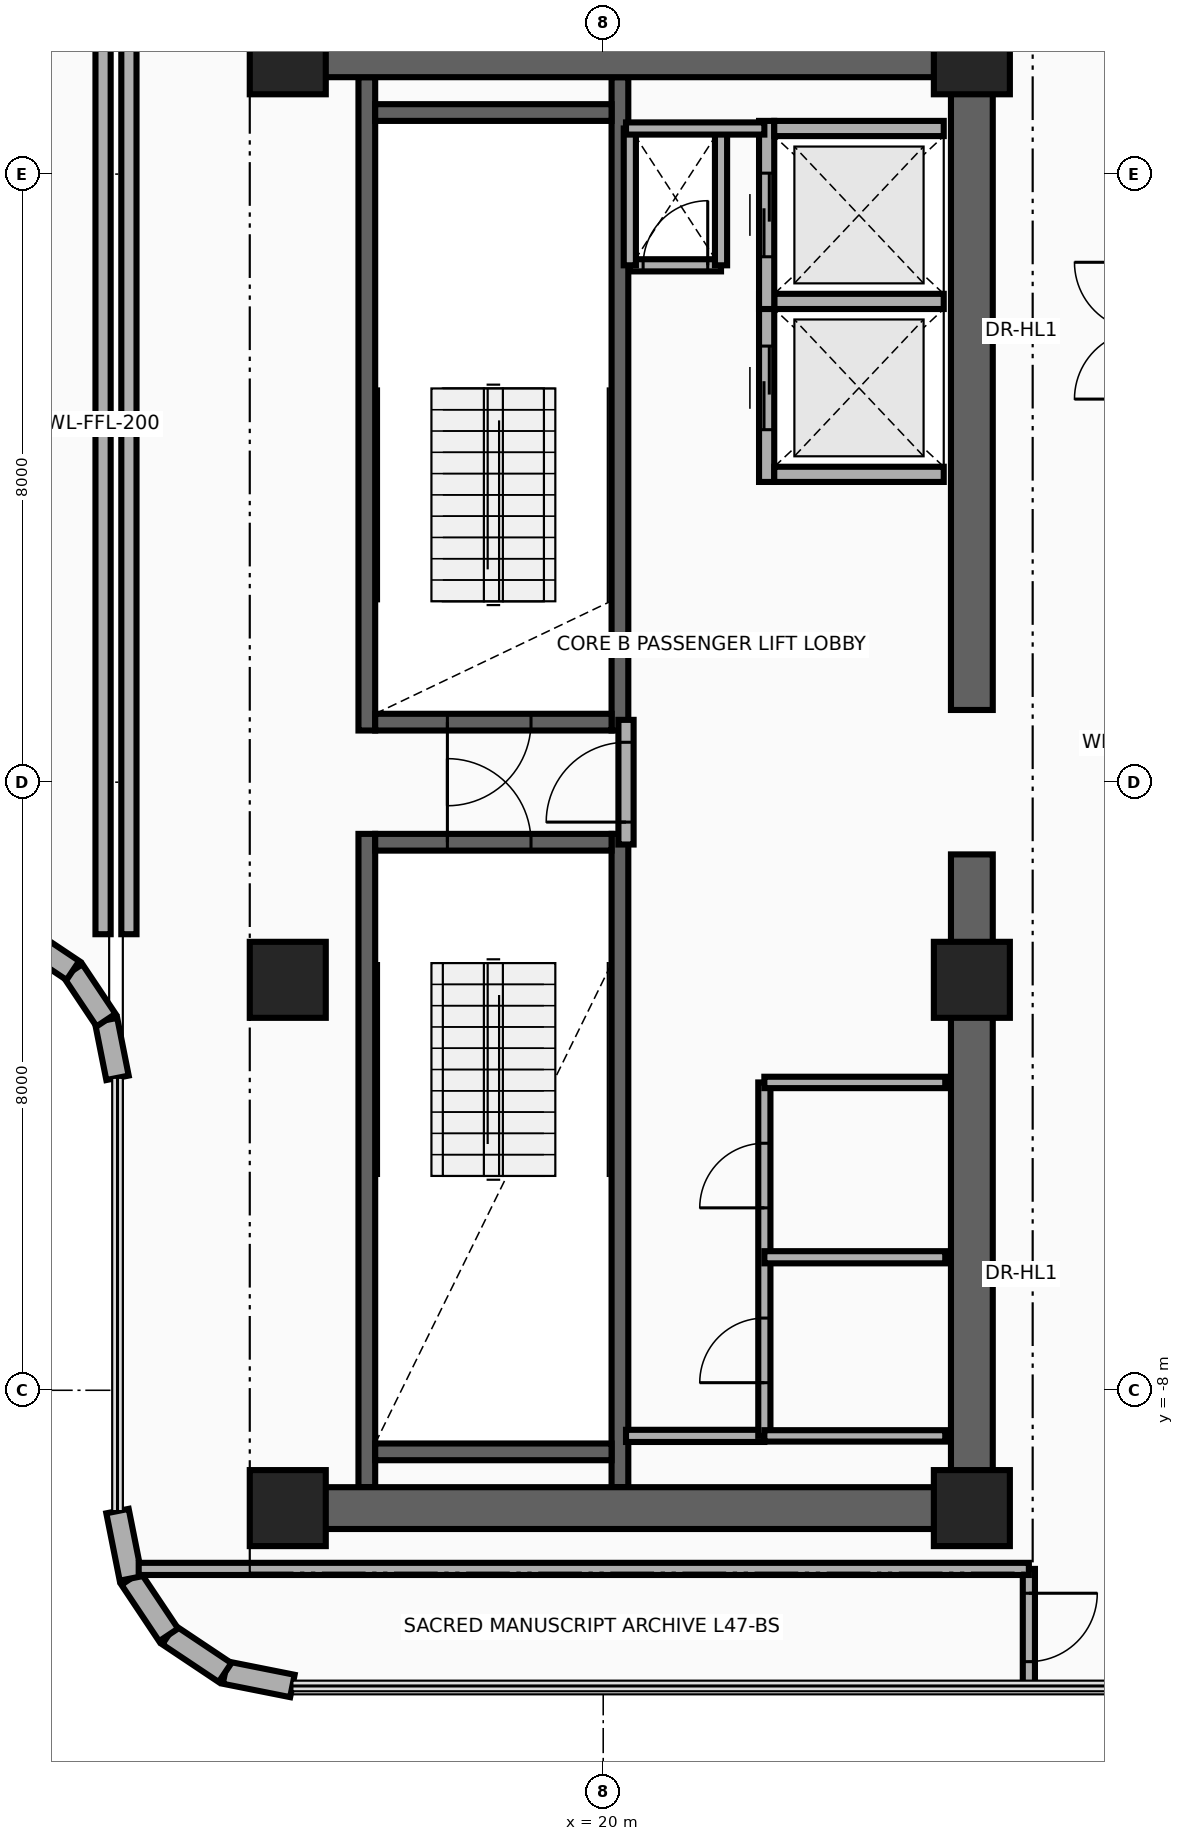
"""IFC4 building model, lengths in metres.
Left out: names, types, materials, properties, quantities, classifications, styles, units other than length and angle.
Written with IfcOpenShell. Run it as: python <this file> out.ifc"""

import sys

from ifc_helpers import new_model, si_unit, direction, frame, frame_2d, origin, origin_2d, place, context, subcontext, project, spatial, rectangle, extrude, source, transform, mapped, element, fill, save


model = new_model("IFC4")
c1 = context("Model", 3, precision=1e-05, world=origin(), true_north=direction((0.0, 1.0)))
c2 = subcontext(c1, "Body", "Model", "MODEL_VIEW")
j1 = project(units=[si_unit("LENGTHUNIT", "METRE"), si_unit("PLANEANGLEUNIT", "RADIAN")], contexts=[c1])
p1 = place(None, origin())
s1 = spatial("IfcSite", under=j1, at=p1, CompositionType="ELEMENT")
p2 = place(p1, origin())
s2 = spatial("IfcBuilding", under=s1, at=p2, CompositionType="ELEMENT")
p3 = place(p2, frame((0.0, 0.0, 184.45)))
s3 = spatial("IfcBuildingStorey", under=s2, at=p3, CompositionType="ELEMENT", Elevation=184.45)
for number, where, z_axis, x_axis in (
    (1, (16.89, 0.68, 0.0), (0.0, 0.0, 1.0), (0.0, 1.0, 0.0)),
    (2, (20.22, 0.68, 0.0), (0.0, 0.0, 1.0), (0.0, 1.0, 0.0)),
):
    element("IfcWall", number, at=place(p3, frame(where, z_axis=z_axis, x_axis=x_axis)), inside=s3, PredefinedType="SHEAR", context=c2, shape_type="SweptSolid", body=[
        extrude(rectangle(XDim=8.595, YDim=0.22, at=frame_2d((4.297, 0.0))), origin(), (0.0, 0.0, 1.0), 3.63),
    ])
p4 = place(p3, frame((17.0, 0.79, 0.0), z_axis=(0.0, 0.0, 1.0), x_axis=(1.0, 0.0, 0.0)))
e3 = element("IfcWall", 3, at=p4, inside=s3, PredefinedType="SHEAR", context=c2, shape_type="SweptSolid", body=[
    extrude(rectangle(XDim=3.11, YDim=0.22, at=frame_2d((1.555, 0.0))), origin(), (0.0, 0.0, 1.0), 3.63),
])
p5 = place(p4, frame((0.95, 0.0, 0.0)))
e4 = element("IfcOpeningElement", 4, at=p5, cuts=e3, PredefinedType="OPENING", context=c2, shape_type="SweptSolid", body=[
    extrude(rectangle(XDim=1.1, YDim=2.15, at=frame_2d((0.55, 1.075))), frame((0.0, 0.125, 0.0), z_axis=(0.0, -1.0, 0.0), x_axis=(1.0, 0.0, 0.0)), (0.0, 0.0, 1.0), 0.25),
])
p6 = place(p3, frame((17.0, 8.81, 0.0), z_axis=(0.0, 0.0, 1.0), x_axis=(1.0, 0.0, 0.0)))
e5 = element("IfcWall", 5, at=p6, inside=s3, PredefinedType="SHEAR", context=c2, shape_type="SweptSolid", body=[
    extrude(rectangle(XDim=3.11, YDim=0.22, at=frame_2d((1.555, 0.0))), origin(), (0.0, 0.0, 1.0), 3.63),
])
for number, where, z_axis, x_axis in (
    (6, (16.89, -9.275, 0.0), (0.0, 0.0, 1.0), (0.0, 1.0, 0.0)),
    (7, (20.22, -9.275, 0.0), (0.0, 0.0, 1.0), (0.0, 1.0, 0.0)),
):
    element("IfcWall", number, at=place(p3, frame(where, z_axis=z_axis, x_axis=x_axis)), inside=s3, PredefinedType="SHEAR", context=c2, shape_type="SweptSolid", body=[
        extrude(rectangle(XDim=8.595, YDim=0.22, at=frame_2d((4.297, 0.0))), origin(), (0.0, 0.0, 1.0), 3.63),
    ])
p7 = place(p3, frame((17.0, -8.81, 0.0), z_axis=(0.0, 0.0, 1.0), x_axis=(1.0, 0.0, 0.0)))
e8 = element("IfcWall", 8, at=p7, inside=s3, PredefinedType="SHEAR", context=c2, shape_type="SweptSolid", body=[
    extrude(rectangle(XDim=3.11, YDim=0.22, at=frame_2d((1.555, 0.0))), origin(), (0.0, 0.0, 1.0), 3.63),
])
p8 = place(p3, frame((17.0, -0.79, 0.0), z_axis=(0.0, 0.0, 1.0), x_axis=(1.0, 0.0, 0.0)))
e9 = element("IfcWall", 9, at=p8, inside=s3, PredefinedType="SHEAR", context=c2, shape_type="SweptSolid", body=[
    extrude(rectangle(XDim=3.11, YDim=0.22, at=frame_2d((1.555, 0.0))), origin(), (0.0, 0.0, 1.0), 3.63),
])
p9 = place(p8, frame((0.95, 0.0, 0.0)))
e10 = element("IfcOpeningElement", 10, at=p9, cuts=e9, PredefinedType="OPENING", context=c2, shape_type="SweptSolid", body=[
    extrude(rectangle(XDim=1.1, YDim=2.15, at=frame_2d((0.55, 1.075))), frame((0.0, 0.125, 0.0), z_axis=(0.0, -1.0, 0.0), x_axis=(1.0, 0.0, 0.0)), (0.0, 0.0, 1.0), 0.25),
])
for number, where, z_axis, x_axis in (
    (11, (24.85, -9.825, 0.0), (0.0, 0.0, 1.0), (0.0, 1.0, 0.0)),
    (12, (24.85, 0.95, 0.0), (0.0, 0.0, 1.0), (0.0, 1.0, 0.0)),
):
    element("IfcWall", number, at=place(p3, frame(where, z_axis=z_axis, x_axis=x_axis)), inside=s3, PredefinedType="SHEAR", context=c2, shape_type="SweptSolid", body=[
        extrude(rectangle(XDim=8.875, YDim=0.55, at=frame_2d((4.438, 0.0))), origin(), (0.0, 0.0, 1.0), 3.63),
    ])
for number, where, z_axis, x_axis in (
    (13, (15.85, 9.55, 0.0), (0.0, 0.0, 1.0), (1.0, 0.0, 0.0)),
    (14, (15.85, -9.55, 0.0), (0.0, 0.0, 1.0), (1.0, 0.0, 0.0)),
):
    element("IfcWall", number, at=place(p3, frame(where, z_axis=z_axis, x_axis=x_axis)), inside=s3, PredefinedType="SHEAR", context=c2, shape_type="SweptSolid", body=[
        extrude(rectangle(XDim=9.0, YDim=0.55, at=frame_2d((4.5, 0.0))), origin(), (0.0, 0.0, 1.0), 3.63),
    ])
m1 = source(origin(), c2, "Body", "SweptSolid", [
    extrude(rectangle(XDim=1.0, YDim=1.0, at=origin_2d()), origin(), (0.0, 0.0, 1.0), 3.95),
])
for number, where, z_axis, x_axis in (
    (15, (15.85, -9.55, 0.0), (0.0, 0.0, 1.0), (1.0, 0.0, 0.0)),
    (16, (24.85, -9.55, 0.0), (0.0, 0.0, 1.0), (1.0, 0.0, 0.0)),
    (17, (15.85, -2.6, 0.0), (0.0, 0.0, 1.0), (1.0, 0.0, 0.0)),
    (18, (24.85, -2.6, 0.0), (0.0, 0.0, 1.0), (1.0, 0.0, 0.0)),
    (19, (15.85, 9.55, 0.0), (0.0, 0.0, 1.0), (1.0, 0.0, 0.0)),
    (20, (24.85, 9.55, 0.0), (0.0, 0.0, 1.0), (1.0, 0.0, 0.0)),
):
    element("IfcColumn", number, at=place(p3, frame(where, z_axis=z_axis, x_axis=x_axis)), inside=s3, PredefinedType="COLUMN", context=c2, shape_type="MappedRepresentation", body=[
        mapped(m1, transform((0.0, 0.0, 0.0), x_axis=(1.0, 0.0, 0.0), y_axis=(0.0, 1.0, 0.0), z_axis=(0.0, 0.0, 1.0), scale=1.0)),
    ])
p10 = place(p3, frame((15.911, -11.89, 0.0), z_axis=(0.0, 0.0, 1.0), x_axis=(-0.980798241101, 0.195025152871, 0.0)))
e21 = element("IfcWall", 21, at=p10, inside=s3, PredefinedType="SOLIDWALL", context=c2, shape_type="SweptSolid", body=[
    extrude(rectangle(XDim=0.904, YDim=0.3, at=frame_2d((0.452, 0.0))), origin(), (0.0, 0.0, 1.0), 3.63),
])
for number, where, z_axis, x_axis in (
    (22, (15.024, -11.714, 0.0), (0.0, 0.0, 1.0), (-0.832, 0.556, 0.0)),
    (23, (14.282, -11.218, 0.0), (0.0, 0.0, 1.0), (-0.556, 0.832, 0.0)),
):
    element("IfcWall", number, at=place(p3, frame(where, z_axis=z_axis, x_axis=x_axis)), inside=s3, PredefinedType="SOLIDWALL", context=c2, shape_type="SweptSolid", body=[
        extrude(rectangle(XDim=0.893, YDim=0.3, at=frame_2d((0.446, 0.0))), origin(), (0.0, 0.0, 1.0), 3.63),
    ])
p11 = place(p3, frame((13.786, -10.476, 0.0), z_axis=(0.0, 0.0, 1.0), x_axis=(-0.195025152871, 0.980798241101, 0.0)))
e24 = element("IfcWall", 24, at=p11, inside=s3, PredefinedType="SOLIDWALL", context=c2, shape_type="SweptSolid", body=[
    extrude(rectangle(XDim=0.904, YDim=0.3, at=frame_2d((0.452, 0.0))), origin(), (0.0, 0.0, 1.0), 3.63),
])
p12 = place(p3, frame((13.61, -3.889, 0.0), z_axis=(0.0, 0.0, 1.0), x_axis=(-0.195206365311, 0.98076219082, 0.0)))
e25 = element("IfcWall", 25, at=p12, inside=s3, PredefinedType="SOLIDWALL", context=c2, shape_type="SweptSolid", body=[
    extrude(rectangle(XDim=0.774, YDim=0.3, at=frame_2d((0.387, 0.0))), origin(), (0.0, 0.0, 1.0), 3.63),
])
for number, where, z_axis, x_axis in (
    (26, (13.459, -3.13, 0.0), (0.0, 0.0, 1.0), (-0.556, 0.831, 0.0)),
    (27, (13.023, -2.477, 0.0), (0.0, 0.0, 1.0), (-0.831, 0.556, 0.0)),
):
    element("IfcWall", number, at=place(p3, frame(where, z_axis=z_axis, x_axis=x_axis)), inside=s3, PredefinedType="SOLIDWALL", context=c2, shape_type="SweptSolid", body=[
        extrude(rectangle(XDim=0.785, YDim=0.3, at=frame_2d((0.393, 0.0))), origin(), (0.0, 0.0, 1.0), 3.63),
    ])
p13 = place(p3, frame((22.15, 3.95, 0.0), z_axis=(0.0, 0.0, 1.0), x_axis=(0.0, 1.0, 0.0)))
e28 = element("IfcWall", 28, at=p13, inside=s3, PredefinedType="MOVABLE", context=c2, shape_type="SweptSolid", body=[
    extrude(rectangle(XDim=2.475, YDim=0.2, at=frame_2d((1.238, 0.0))), origin(), (0.0, 0.0, 1.0), 3.63),
])
p14 = place(p13, frame((0.688, 0.0, 0.0)))
e29 = element("IfcOpeningElement", 29, at=p14, cuts=e28, PredefinedType="OPENING", context=c2, shape_type="SweptSolid", body=[
    extrude(rectangle(XDim=1.1, YDim=2.1, at=frame_2d((0.55, 1.05))), frame((0.0, 0.115, 0.0), z_axis=(0.0, -1.0, 0.0), x_axis=(1.0, 0.0, 0.0)), (0.0, 0.0, 1.0), 0.23),
])
for number, where, z_axis, x_axis in (
    (30, (22.25, 4.05, 0.0), (0.0, 0.0, 1.0), (1.0, 0.0, 0.0)),
    (31, (22.25, 6.325, 0.0), (0.0, 0.0, 1.0), (1.0, 0.0, 0.0)),
):
    element("IfcWall", number, at=place(p3, frame(where, z_axis=z_axis, x_axis=x_axis)), inside=s3, PredefinedType="MOVABLE", context=c2, shape_type="SweptSolid", body=[
        extrude(rectangle(XDim=2.23, YDim=0.2, at=frame_2d((1.115, 0.0))), origin(), (0.0, 0.0, 1.0), 3.63),
    ])
p15 = place(p3, frame((22.15, 6.225, 0.0), z_axis=(0.0, 0.0, 1.0), x_axis=(0.0, 1.0, 0.0)))
e32 = element("IfcWall", 32, at=p15, inside=s3, PredefinedType="MOVABLE", context=c2, shape_type="SweptSolid", body=[
    extrude(rectangle(XDim=2.475, YDim=0.2, at=frame_2d((1.237, 0.0))), origin(), (0.0, 0.0, 1.0), 3.63),
])
p16 = place(p15, frame((0.688, 0.0, 0.0)))
e33 = element("IfcOpeningElement", 33, at=p16, cuts=e32, PredefinedType="OPENING", context=c2, shape_type="SweptSolid", body=[
    extrude(rectangle(XDim=1.1, YDim=2.1, at=frame_2d((0.55, 1.05))), frame((0.0, 0.115, 0.0), z_axis=(0.0, -1.0, 0.0), x_axis=(1.0, 0.0, 0.0)), (0.0, 0.0, 1.0), 0.23),
])
p17 = place(p3, frame((22.25, 8.6, 0.0), z_axis=(0.0, 0.0, 1.0), x_axis=(1.0, 0.0, 0.0)))
e34 = element("IfcWall", 34, at=p17, inside=s3, PredefinedType="MOVABLE", context=c2, shape_type="SweptSolid", body=[
    extrude(rectangle(XDim=2.23, YDim=0.2, at=frame_2d((1.115, 0.0))), origin(), (0.0, 0.0, 1.0), 3.63),
])
p18 = place(p3, frame((20.3, -0.82, 0.0), z_axis=(0.0, 0.0, 1.0), x_axis=(0.0, 1.0, 0.0)))
e35 = element("IfcWall", 35, at=p18, inside=s3, PredefinedType="PARTITIONING", context=c2, shape_type="SweptSolid", body=[
    extrude(rectangle(XDim=1.64, YDim=0.2, at=frame_2d((0.82, 0.0))), origin(), (0.0, 0.0, 1.0), 3.63),
])
p19 = place(p18, frame((0.295, 0.0, 0.0)))
e36 = element("IfcOpeningElement", 36, at=p19, cuts=e35, PredefinedType="OPENING", context=c2, shape_type="SweptSolid", body=[
    extrude(rectangle(XDim=1.05, YDim=2.15, at=frame_2d((0.525, 1.075))), frame((0.0, 0.115, 0.0), z_axis=(0.0, -1.0, 0.0), x_axis=(1.0, 0.0, 0.0)), (0.0, 0.0, 1.0), 0.23),
])
p20 = place(p3, frame((20.35, 6.8, 0.0), z_axis=(0.0, 0.0, 1.0), x_axis=(1.0, 0.0, 0.0)))
e37 = element("IfcWall", 37, at=p20, inside=s3, PredefinedType="PARTITIONING", context=c2, shape_type="SweptSolid", body=[
    extrude(rectangle(XDim=1.2, YDim=0.16, at=frame_2d((0.6, 0.0))), origin(), (0.0, 0.0, 1.0), 3.63),
])
p21 = place(p20, frame((0.175, 0.0, 0.0)))
e38 = element("IfcOpeningElement", 38, at=p21, cuts=e37, PredefinedType="OPENING", context=c2, shape_type="SweptSolid", body=[
    extrude(rectangle(XDim=0.85, YDim=2.05, at=frame_2d((0.425, 1.025))), frame((0.0, 0.095, 0.0), z_axis=(0.0, -1.0, 0.0), x_axis=(1.0, 0.0, 0.0)), (0.0, 0.0, 1.0), 0.19),
])
for number, where, z_axis, x_axis in (
    (39, (21.55, 6.8, 0.0), (0.0, 0.0, 1.0), (0.0, 1.0, 0.0)),
    (40, (20.35, 6.8, 0.0), (0.0, 0.0, 1.0), (0.0, 1.0, 0.0)),
):
    element("IfcWall", number, at=place(p3, frame(where, z_axis=z_axis, x_axis=x_axis)), inside=s3, PredefinedType="PARTITIONING", context=c2, shape_type="SweptSolid", body=[
        extrude(rectangle(XDim=1.8, YDim=0.16, at=frame_2d((0.9, 0.0))), origin(), (0.0, 0.0, 1.0), 3.63),
    ])
for number, where, z_axis, x_axis in (
    (41, (20.3, -8.6, 0.0), (0.0, 0.0, 1.0), (1.0, 0.0, 0.0)),
    (42, (20.3, 8.6, 0.0), (0.0, 0.0, 1.0), (1.0, 0.0, 0.0)),
):
    element("IfcWall", number, at=place(p3, frame(where, z_axis=z_axis, x_axis=x_axis)), inside=s3, PredefinedType="PARTITIONING", context=c2, shape_type="SweptSolid", body=[
        extrude(rectangle(XDim=1.82, YDim=0.16, at=frame_2d((0.91, 0.0))), origin(), (0.0, 0.0, 1.0), 3.63),
    ])
p22 = place(p3, frame((22.12, -8.6, 0.0), z_axis=(0.0, 0.0, 1.0), x_axis=(0.0, 1.0, 0.0)))
e43 = element("IfcWall", 43, at=p22, inside=s3, PredefinedType="PARTITIONING", context=c2, shape_type="SweptSolid", body=[
    extrude(rectangle(XDim=4.65, YDim=0.16, at=frame_2d((2.325, 0.0))), origin(), (0.0, 0.0, 1.0), 3.63),
])
p23 = place(p22, frame((0.7, 0.0, 0.0)))
e44 = element("IfcOpeningElement", 44, at=p23, cuts=e43, PredefinedType="OPENING", context=c2, shape_type="SweptSolid", body=[
    extrude(rectangle(XDim=0.85, YDim=2.05, at=frame_2d((0.425, 1.025))), frame((0.0, 0.095, 0.0), z_axis=(0.0, -1.0, 0.0), x_axis=(1.0, 0.0, 0.0)), (0.0, 0.0, 1.0), 0.19),
])
p24 = place(p22, frame((3.0, 0.0, 0.0)))
e45 = element("IfcOpeningElement", 45, at=p24, cuts=e43, PredefinedType="OPENING", context=c2, shape_type="SweptSolid", body=[
    extrude(rectangle(XDim=0.85, YDim=2.05, at=frame_2d((0.425, 1.025))), frame((0.0, 0.095, 0.0), z_axis=(0.0, -1.0, 0.0), x_axis=(1.0, 0.0, 0.0)), (0.0, 0.0, 1.0), 0.19),
])
for number, where, z_axis, x_axis in (
    (46, (22.12, -3.95, 0.0), (0.0, 0.0, 1.0), (1.0, 0.0, 0.0)),
    (47, (22.12, -8.6, 0.0), (0.0, 0.0, 1.0), (1.0, 0.0, 0.0)),
):
    element("IfcWall", number, at=place(p3, frame(where, z_axis=z_axis, x_axis=x_axis)), inside=s3, PredefinedType="PARTITIONING", context=c2, shape_type="SweptSolid", body=[
        extrude(rectangle(XDim=2.38, YDim=0.15, at=frame_2d((1.19, 0.0))), origin(), (0.0, 0.0, 1.0), 3.63),
    ])
p25 = place(p3, frame((22.12, -6.25, 0.0), z_axis=(0.0, 0.0, 1.0), x_axis=(1.0, 0.0, 0.0)))
e48 = element("IfcWall", 48, at=p25, inside=s3, PredefinedType="PARTITIONING", context=c2, shape_type="SweptSolid", body=[
    extrude(rectangle(XDim=2.38, YDim=0.16, at=frame_2d((1.19, 0.0))), origin(), (0.0, 0.0, 1.0), 3.63),
])
for number, where, z_axis, x_axis in (
    (49, (13.42, -2.0, 0.0), (0.0, 0.0, 1.0), (0.0, 1.0, 0.0)),
    (50, (13.76, -2.0, 0.0), (0.0, 0.0, 1.0), (0.0, 1.0, 0.0)),
):
    element("IfcWall", number, at=place(p3, frame(where, z_axis=z_axis, x_axis=x_axis)), inside=s3, PredefinedType="PARTITIONING", context=c2, shape_type="SweptSolid", body=[
        extrude(rectangle(XDim=13.42, YDim=0.2, at=frame_2d((6.71, 0.0))), origin(), (0.0, 0.0, 1.0), 2.665),
    ])
p26 = place(p3, frame((25.6, -11.89, 0.0), z_axis=(0.0, 0.0, 1.0), x_axis=(0.0, 1.0, 0.0)))
e51 = element("IfcWall", 51, at=p26, inside=s3, PredefinedType="PARTITIONING", context=c2, shape_type="SweptSolid", body=[
    extrude(rectangle(XDim=1.54, YDim=0.16, at=frame_2d((0.77, 0.0))), origin(), (0.0, 0.0, 1.0), 3.63),
])
p27 = place(p26, frame((0.32, 0.0, 0.0)))
e52 = element("IfcOpeningElement", 52, at=p27, cuts=e51, PredefinedType="OPENING", context=c2, shape_type="SweptSolid", body=[
    extrude(rectangle(XDim=0.9, YDim=2.1, at=frame_2d((0.45, 1.05))), frame((0.0, 0.095, 0.0), z_axis=(0.0, -1.0, 0.0), x_axis=(1.0, 0.0, 0.0)), (0.0, 0.0, 1.0), 0.19),
])
p28 = place(p3, frame((13.889, -10.35, 0.0), z_axis=(0.0, 0.0, 1.0), x_axis=(1.0, 0.0, 0.0)))
e53 = element("IfcWall", 53, at=p28, inside=s3, PredefinedType="PARTITIONING", context=c2, shape_type="SweptSolid", body=[
    extrude(rectangle(XDim=11.711, YDim=0.16, at=frame_2d((5.855, 0.0))), origin(), (0.0, 0.0, 1.0), 3.63),
])
p29 = place(p14, origin())
e54 = element("IfcDoor", 54, at=p29, inside=s3, OperationType="DOUBLE_DOOR_SLIDING", PredefinedType="DOOR", context=c2, shape_type="SweptSolid", body=[
    extrude(rectangle(XDim=1.1, YDim=2.1, at=frame_2d((0.55, 1.05))), frame((0.0, 0.025, 0.0), z_axis=(0.0, -1.0, 0.0), x_axis=(1.0, 0.0, 0.0)), (0.0, 0.0, 1.0), 0.05),
])
fill(e29, e54)
p30 = place(p16, origin())
e55 = element("IfcDoor", 55, at=p30, inside=s3, OperationType="DOUBLE_DOOR_SLIDING", PredefinedType="DOOR", context=c2, shape_type="SweptSolid", body=[
    extrude(rectangle(XDim=1.1, YDim=2.1, at=frame_2d((0.55, 1.05))), frame((0.0, 0.025, 0.0), z_axis=(0.0, -1.0, 0.0), x_axis=(1.0, 0.0, 0.0)), (0.0, 0.0, 1.0), 0.05),
])
fill(e33, e55)
p31 = place(p19, origin())
e56 = element("IfcDoor", 56, at=p31, inside=s3, OperationType="SINGLE_SWING_RIGHT", PredefinedType="DOOR", context=c2, shape_type="SweptSolid", body=[
    extrude(rectangle(XDim=1.05, YDim=2.15, at=frame_2d((0.525, 1.075))), frame((0.0, 0.025, 0.0), z_axis=(0.0, -1.0, 0.0), x_axis=(1.0, 0.0, 0.0)), (0.0, 0.0, 1.0), 0.05),
])
fill(e36, e56)
p32 = place(p5, frame((1.1, 0.0, 0.0), z_axis=(0.0, 0.0, 1.0), x_axis=(-1.0, 0.0, 0.0)))
e57 = element("IfcDoor", 57, at=p32, inside=s3, OperationType="SINGLE_SWING_LEFT", PredefinedType="DOOR", context=c2, shape_type="SweptSolid", body=[
    extrude(rectangle(XDim=1.1, YDim=2.15, at=frame_2d((0.55, 1.075))), frame((0.0, 0.025, 0.0), z_axis=(0.0, -1.0, 0.0), x_axis=(1.0, 0.0, 0.0)), (0.0, 0.0, 1.0), 0.05),
])
fill(e4, e57)
p33 = place(p9, origin())
e58 = element("IfcDoor", 58, at=p33, inside=s3, OperationType="SINGLE_SWING_RIGHT", PredefinedType="DOOR", context=c2, shape_type="SweptSolid", body=[
    extrude(rectangle(XDim=1.1, YDim=2.15, at=frame_2d((0.55, 1.075))), frame((0.0, 0.025, 0.0), z_axis=(0.0, -1.0, 0.0), x_axis=(1.0, 0.0, 0.0)), (0.0, 0.0, 1.0), 0.05),
])
fill(e10, e58)
p34 = place(p21, origin())
e59 = element("IfcDoor", 59, at=p34, inside=s3, OperationType="SINGLE_SWING_LEFT", PredefinedType="DOOR", context=c2, shape_type="SweptSolid", body=[
    extrude(rectangle(XDim=0.85, YDim=2.05, at=frame_2d((0.425, 1.025))), frame((0.0, 0.025, 0.0), z_axis=(0.0, -1.0, 0.0), x_axis=(1.0, 0.0, 0.0)), (0.0, 0.0, 1.0), 0.05),
])
fill(e38, e59)
p35 = place(p23, origin())
e60 = element("IfcDoor", 60, at=p35, inside=s3, OperationType="SINGLE_SWING_RIGHT", PredefinedType="DOOR", context=c2, shape_type="SweptSolid", body=[
    extrude(rectangle(XDim=0.85, YDim=2.05, at=frame_2d((0.425, 1.025))), frame((0.0, 0.025, 0.0), z_axis=(0.0, -1.0, 0.0), x_axis=(1.0, 0.0, 0.0)), (0.0, 0.0, 1.0), 0.05),
])
fill(e44, e60)
p36 = place(p24, origin())
e61 = element("IfcDoor", 61, at=p36, inside=s3, OperationType="SINGLE_SWING_LEFT", PredefinedType="DOOR", context=c2, shape_type="SweptSolid", body=[
    extrude(rectangle(XDim=0.85, YDim=2.05, at=frame_2d((0.425, 1.025))), frame((0.0, 0.025, 0.0), z_axis=(0.0, -1.0, 0.0), x_axis=(1.0, 0.0, 0.0)), (0.0, 0.0, 1.0), 0.05),
])
fill(e45, e61)
p37 = place(p27, frame((0.9, 0.0, 0.0), z_axis=(0.0, 0.0, 1.0), x_axis=(-1.0, 0.0, 0.0)))
e62 = element("IfcDoor", 62, at=p37, inside=s3, OperationType="SINGLE_SWING_LEFT", PredefinedType="DOOR", context=c2, shape_type="SweptSolid", body=[
    extrude(rectangle(XDim=0.9, YDim=2.1, at=frame_2d((0.45, 1.05))), frame((0.0, 0.025, 0.0), z_axis=(0.0, -1.0, 0.0), x_axis=(1.0, 0.0, 0.0)), (0.0, 0.0, 1.0), 0.05),
])
fill(e52, e62)
save(model, sys.argv[1])
